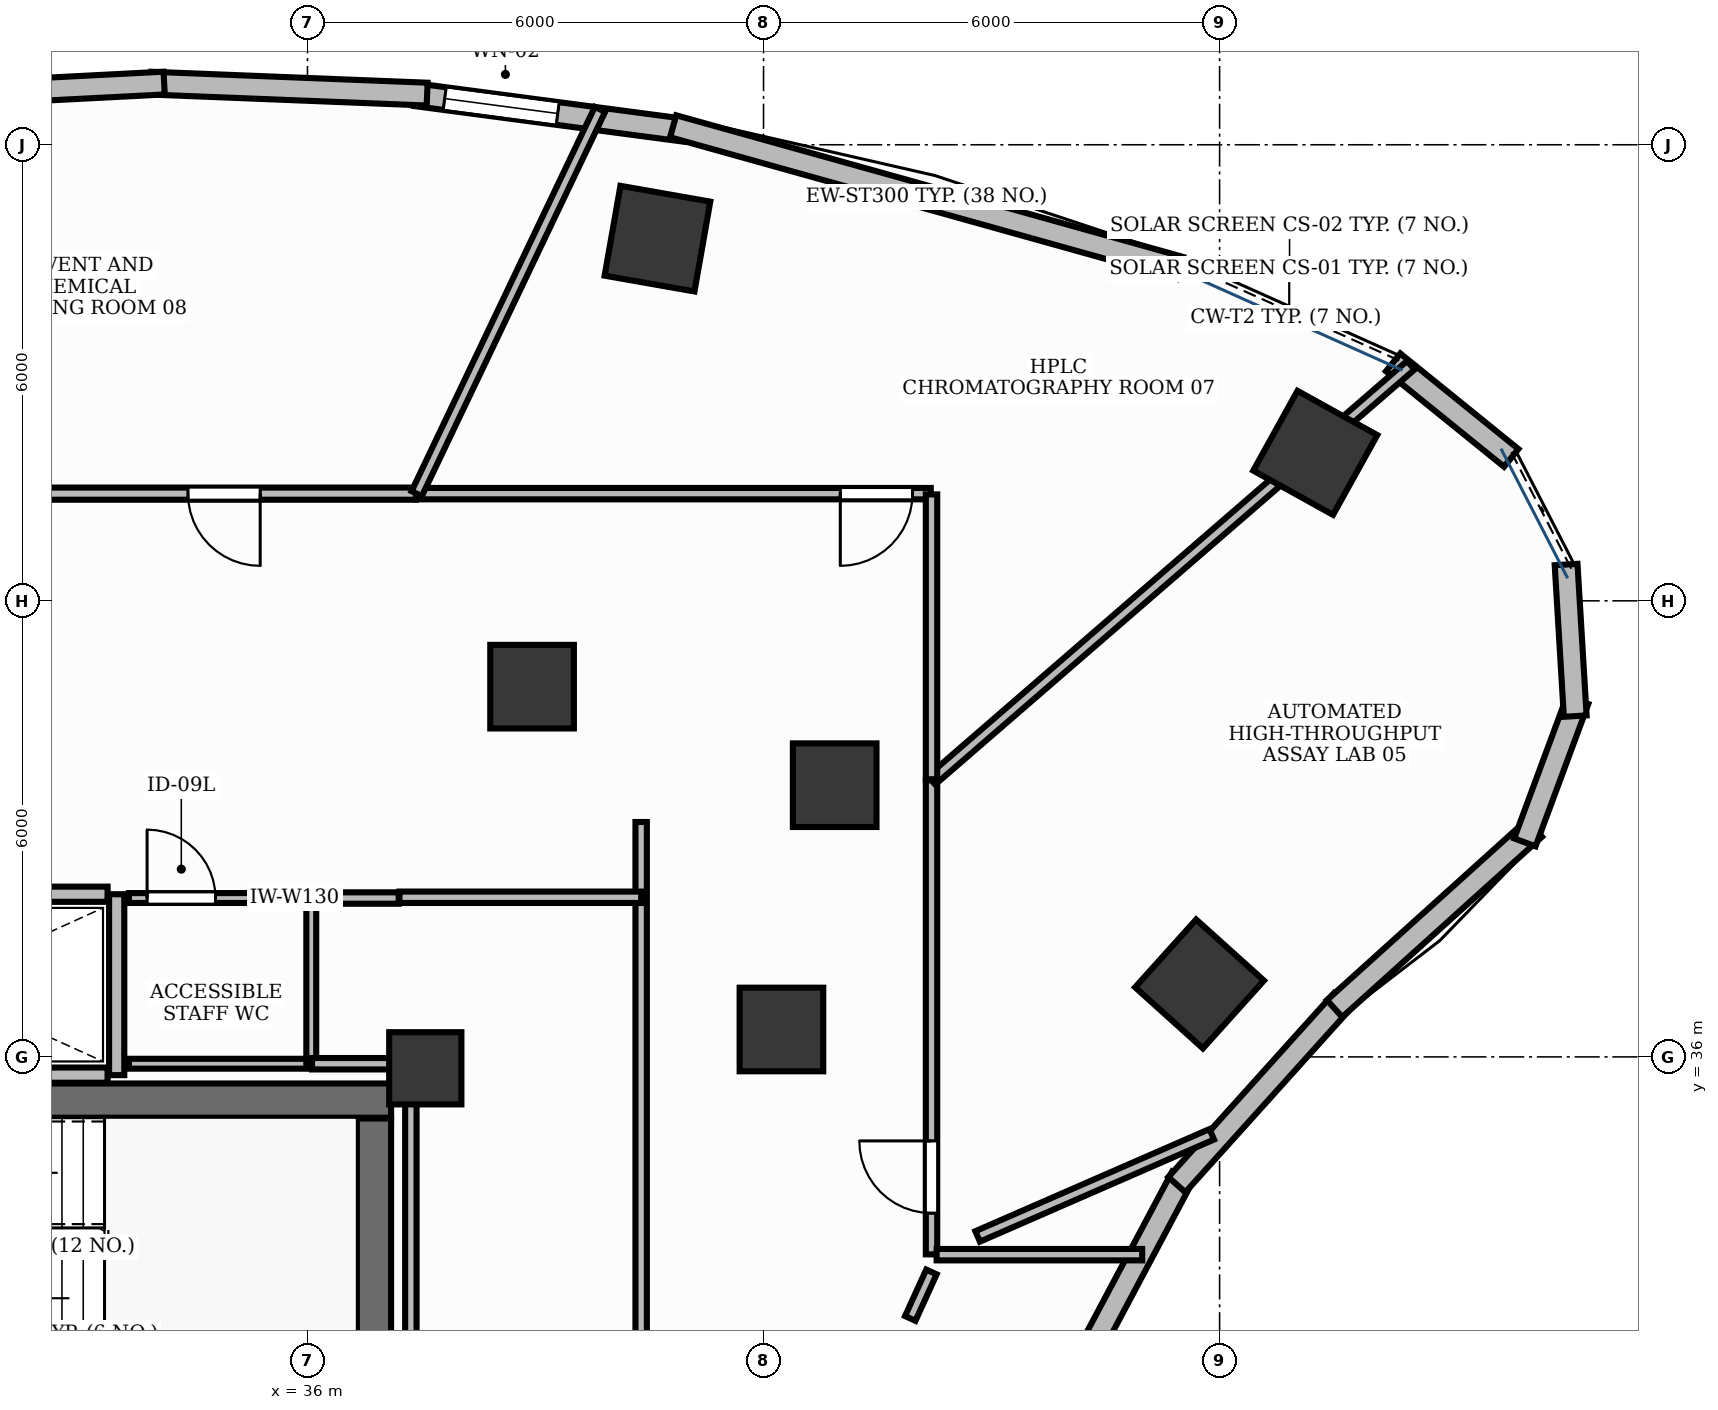
"""IFC4 building model, lengths in metres.
Left out: names, types, materials, properties, quantities, classifications, styles, units other than length and angle.
Written with IfcOpenShell. Run it as: python <this file> out.ifc"""

import sys

from ifc_helpers import new_model, si_unit, direction, frame, frame_2d, origin, origin_2d, place, context, subcontext, project, spatial, rectangle, extrude, element, fill, save


model = new_model("IFC4")
c1 = context("Model", 3, precision=1e-05, world=origin(), true_north=direction((0.0, 1.0)))
c2 = subcontext(c1, "Body", "Model", "MODEL_VIEW")
j1 = project(units=[si_unit("LENGTHUNIT", "METRE"), si_unit("PLANEANGLEUNIT", "RADIAN")], contexts=[c1])
p1 = place(None, origin())
s1 = spatial("IfcSite", under=j1, at=p1, CompositionType="ELEMENT")
p2 = place(p1, origin())
s2 = spatial("IfcBuilding", under=s1, at=p2, CompositionType="ELEMENT")
p3 = place(p2, frame((0.0, 0.0, 106.8)))
s3 = spatial("IfcBuildingStorey", under=s2, at=p3, CompositionType="ELEMENT", Elevation=106.8)
p4 = place(p3, frame((28.852, 35.425, 0.0), z_axis=(0.0, 0.0, 1.0), x_axis=(1.0, 0.0, 0.0)))
e1 = element("IfcWall", 1, at=p4, inside=s3, PredefinedType="SHEAR", context=c2, shape_type="SweptSolid", body=[
    extrude(rectangle(XDim=8.248, YDim=0.45, at=frame_2d((4.124, 0.0))), origin(), (0.0, 0.0, 1.0), 3.9),
])
p5 = place(p3, frame((36.875, 32.11, 0.0), z_axis=(0.0, 0.0, 1.0), x_axis=(0.0, 1.0, 0.0)))
e2 = element("IfcWall", 2, at=p5, inside=s3, PredefinedType="SHEAR", context=c2, shape_type="SweptSolid", body=[
    extrude(rectangle(XDim=3.08, YDim=0.45, at=frame_2d((1.54, 0.0))), origin(), (0.0, 0.0, 1.0), 3.9),
])
p6 = place(p3, frame((37.55, 35.85, -0.0), z_axis=(0.0, 0.0, 1.0), x_axis=(1.0, 0.0, 0.0)))
e3 = element("IfcColumn", 3, at=p6, inside=s3, PredefinedType="PILASTER", context=c2, shape_type="SweptSolid", body=[
    extrude(rectangle(XDim=0.95, YDim=0.95, at=origin_2d()), origin(), (0.0, 0.0, 1.0), 3.901),
])
p7 = place(p3, frame((49.259, 43.947, -0.0), z_axis=(0.0, 0.0, 1.0), x_axis=(-0.874535078577, 0.484962262797, 0.0)))
e4 = element("IfcColumn", 4, at=p7, inside=s3, PredefinedType="COLUMN", context=c2, shape_type="SweptSolid", body=[
    extrude(rectangle(XDim=1.2, YDim=1.2, at=origin_2d()), origin(), (0.0, 0.0, 1.0), 3.901),
])
p8 = place(p3, frame((42.936, 39.575, -0.0), z_axis=(0.0, 0.0, 1.0), x_axis=(1.0, 0.0, 0.0)))
e5 = element("IfcColumn", 5, at=p8, inside=s3, PredefinedType="COLUMN", context=c2, shape_type="SweptSolid", body=[
    extrude(rectangle(XDim=1.1, YDim=1.1, at=origin_2d()), origin(), (0.0, 0.0, 1.0), 3.901),
])
p9 = place(p3, frame((40.604, 46.765, -0.0), z_axis=(0.0, 0.0, 1.0), x_axis=(-0.984868307662, 0.173304404339, 0.0)))
e6 = element("IfcColumn", 6, at=p9, inside=s3, PredefinedType="COLUMN", context=c2, shape_type="SweptSolid", body=[
    extrude(rectangle(XDim=1.2, YDim=1.2, at=origin_2d()), origin(), (0.0, 0.0, 1.0), 3.901),
])
p10 = place(p3, frame((38.955, 40.871, -0.0), z_axis=(0.0, 0.0, 1.0), x_axis=(1.0, 0.0, 0.0)))
e7 = element("IfcColumn", 7, at=p10, inside=s3, PredefinedType="COLUMN", context=c2, shape_type="SweptSolid", body=[
    extrude(rectangle(XDim=1.1, YDim=1.1, at=origin_2d()), origin(), (0.0, 0.0, 1.0), 3.901),
])
p11 = place(p3, frame((47.736, 36.96, -0.0), z_axis=(0.0, 0.0, 1.0), x_axis=(0.669130606359, 0.743144825477, 0.0)))
e8 = element("IfcColumn", 8, at=p11, inside=s3, PredefinedType="COLUMN", context=c2, shape_type="SweptSolid", body=[
    extrude(rectangle(XDim=1.2, YDim=1.2, at=origin_2d()), origin(), (0.0, 0.0, 1.0), 3.901),
])
p12 = place(p3, frame((42.236, 36.361, -0.0), z_axis=(0.0, 0.0, 1.0), x_axis=(1.0, 0.0, 0.0)))
e9 = element("IfcColumn", 9, at=p12, inside=s3, PredefinedType="COLUMN", context=c2, shape_type="SweptSolid", body=[
    extrude(rectangle(XDim=1.1, YDim=1.1, at=origin_2d()), origin(), (0.0, 0.0, 1.0), 3.901),
])
p13 = place(p3, frame((40.964, 48.19, 0.0), z_axis=(0.0, 0.0, 1.0), x_axis=(-0.991369257822, 0.131099178664, 0.0)))
e10 = element("IfcWall", 10, at=p13, inside=s3, PredefinedType="STANDARD", context=c2, shape_type="SweptSolid", body=[
    extrude(rectangle(XDim=3.575, YDim=0.3, at=frame_2d((1.788, 0.0))), origin(), (0.0, 0.0, 1.0), 3.47),
])
p14 = place(p13, frame((1.686, 0.0, 0.95)))
e11 = element("IfcOpeningElement", 11, at=p14, cuts=e10, PredefinedType="OPENING", context=c2, shape_type="SweptSolid", body=[
    extrude(rectangle(XDim=1.5, YDim=1.8, at=frame_2d((0.75, 0.9))), frame((0.0, 0.165, 0.0), z_axis=(0.0, -1.0, 0.0), x_axis=(1.0, 0.0, 0.0)), (0.0, 0.0, 1.0), 0.33),
])
p15 = place(p3, frame((47.479, 46.38, 0.0), z_axis=(0.0, 0.0, 1.0), x_axis=(-0.963116215402, 0.269085777459, 0.0)))
e12 = element("IfcWall", 12, at=p15, inside=s3, PredefinedType="STANDARD", context=c2, shape_type="SweptSolid", body=[
    extrude(rectangle(XDim=6.924, YDim=0.3, at=frame_2d((3.462, 0.0))), origin(), (0.0, 0.0, 1.0), 3.9),
])
p16 = place(p3, frame((37.574, 48.666, 0.0), z_axis=(0.0, 0.0, 1.0), x_axis=(-0.999212076676, 0.039689114679, 0.0)))
e13 = element("IfcWall", 13, at=p16, inside=s3, PredefinedType="STANDARD", context=c2, shape_type="SweptSolid", body=[
    extrude(rectangle(XDim=3.635, YDim=0.3, at=frame_2d((1.818, 0.0))), origin(), (0.0, 0.0, 1.0), 3.9),
])
p17 = place(p3, frame((34.115, 48.812, 0.0), z_axis=(0.0, 0.0, 1.0), x_axis=(-0.998674767218, -0.051465613004, 0.0)))
e14 = element("IfcWall", 14, at=p17, inside=s3, PredefinedType="STANDARD", context=c2, shape_type="SweptSolid", body=[
    extrude(rectangle(XDim=3.634, YDim=0.3, at=frame_2d((1.817, 0.0))), origin(), (0.0, 0.0, 1.0), 3.47),
])
p18 = place(p3, frame((45.98, 31.547, 0.0), z_axis=(0.0, 0.0, 1.0), x_axis=(0.469451284634, 0.882958374645, 0.0)))
e15 = element("IfcWall", 15, at=p18, inside=s3, PredefinedType="STANDARD", context=c2, shape_type="SweptSolid", body=[
    extrude(rectangle(XDim=3.256, YDim=0.3, at=frame_2d((1.628, 0.0))), origin(), (0.0, 0.0, 1.0), 3.9),
])
p19 = place(p3, frame((47.437, 34.319, 0.0), z_axis=(0.0, 0.0, 1.0), x_axis=(0.669167727967, 0.743111399353, 0.0)))
e16 = element("IfcWall", 16, at=p19, inside=s3, PredefinedType="STANDARD", context=c2, shape_type="SweptSolid", body=[
    extrude(rectangle(XDim=3.255, YDim=0.3, at=frame_2d((1.628, 0.0))), origin(), (0.0, 0.0, 1.0), 3.9),
])
p20 = place(p3, frame((49.513, 36.636, 0.0), z_axis=(0.0, 0.0, 1.0), x_axis=(0.74255963233, 0.669779958221, 0.0)))
e17 = element("IfcWall", 17, at=p20, inside=s3, PredefinedType="STANDARD", context=c2, shape_type="SweptSolid", body=[
    extrude(rectangle(XDim=3.539, YDim=0.3, at=frame_2d((1.77, 0.0))), origin(), (0.0, 0.0, 1.0), 3.9),
])
p21 = place(p3, frame((52.016, 38.822, 0.0), z_axis=(0.0, 0.0, 1.0), x_axis=(0.347370087337, 0.937728117539, 0.0)))
e18 = element("IfcWall", 18, at=p21, inside=s3, PredefinedType="STANDARD", context=c2, shape_type="SweptSolid", body=[
    extrude(rectangle(XDim=1.997, YDim=0.3, at=frame_2d((0.999, 0.0))), origin(), (0.0, 0.0, 1.0), 3.9),
])
for number, where, z_axis, x_axis in (
    (19, (52.679, 40.483, 0.0), (0.0, 0.0, 1.0), (-0.06, 0.998, 0.0)),
    (20, (51.836, 43.881, 0.0), (0.0, 0.0, 1.0), (-0.777, 0.629, 0.0)),
):
    element("IfcWall", number, at=place(p3, frame(where, z_axis=z_axis, x_axis=x_axis)), inside=s3, PredefinedType="STANDARD", context=c2, shape_type="SweptSolid", body=[
        extrude(rectangle(XDim=1.998, YDim=0.3, at=frame_2d((0.999, 0.0))), origin(), (0.0, 0.0, 1.0), 3.9),
    ])
p22 = place(p3, frame((33.49, 35.76, 0.0), z_axis=(0.0, 0.0, 1.0), x_axis=(0.0, 1.0, 0.0)))
e21 = element("IfcWall", 21, at=p22, inside=s3, PredefinedType="PARTITIONING", context=c2, shape_type="SweptSolid", body=[
    extrude(rectangle(XDim=2.38, YDim=0.2, at=frame_2d((1.19, 0.0))), origin(), (0.0, 0.0, 1.0), 2.91),
])
for number, where, z_axis, x_axis in (
    (22, (28.8, 35.76, 0.0), (0.0, 0.0, 1.0), (1.0, 0.0, 0.0)),
    (23, (28.8, 38.14, 0.0), (0.0, 0.0, 1.0), (1.0, 0.0, 0.0)),
):
    element("IfcWall", number, at=place(p3, frame(where, z_axis=z_axis, x_axis=x_axis)), inside=s3, PredefinedType="PARTITIONING", context=c2, shape_type="SweptSolid", body=[
        extrude(rectangle(XDim=4.57, YDim=0.2, at=frame_2d((2.285, 0.0))), origin(), (0.0, 0.0, 1.0), 2.91),
    ])
p23 = place(p3, frame((33.65, 38.09, 0.0), z_axis=(0.0, 0.0, 1.0), x_axis=(1.0, 0.0, 0.0)))
e24 = element("IfcWall", 24, at=p23, inside=s3, PredefinedType="PARTITIONING", context=c2, shape_type="SweptSolid", body=[
    extrude(rectangle(XDim=2.4, YDim=0.13, at=frame_2d((1.2, 0.0))), origin(), (0.0, 0.0, 1.0), 2.91),
])
p24 = place(p23, frame((0.24, 0.0, 0.0)))
e25 = element("IfcOpeningElement", 25, at=p24, cuts=e24, PredefinedType="OPENING", context=c2, shape_type="SweptSolid", body=[
    extrude(rectangle(XDim=0.9, YDim=2.15, at=frame_2d((0.45, 1.075))), frame((0.0, 0.08, 0.0), z_axis=(0.0, -1.0, 0.0), x_axis=(1.0, 0.0, 0.0)), (0.0, 0.0, 1.0), 0.16),
])
p25 = place(p3, frame((44.21, 33.402, 0.0), z_axis=(0.0, 0.0, 1.0), x_axis=(0.0, 1.0, 0.0)))
e26 = element("IfcWall", 26, at=p25, inside=s3, PredefinedType="PARTITIONING", context=c2, shape_type="SweptSolid", body=[
    extrude(rectangle(XDim=6.238, YDim=0.15, at=frame_2d((3.119, 0.0))), origin(), (0.0, 0.0, 1.0), 2.91),
])
p26 = place(p25, frame((0.542, 0.0, 0.0)))
e27 = element("IfcOpeningElement", 27, at=p26, cuts=e26, PredefinedType="OPENING", context=c2, shape_type="SweptSolid", body=[
    extrude(rectangle(XDim=0.95, YDim=2.15, at=frame_2d((0.475, 1.075))), frame((0.0, 0.09, 0.0), z_axis=(0.0, -1.0, 0.0), x_axis=(1.0, 0.0, 0.0)), (0.0, 0.0, 1.0), 0.18),
])
p27 = place(p3, frame((40.39, 39.09, 0.0), z_axis=(0.0, 0.0, 1.0), x_axis=(0.0, -1.0, 0.0)))
e28 = element("IfcWall", 28, at=p27, inside=s3, PredefinedType="PARTITIONING", context=c2, shape_type="SweptSolid", body=[
    extrude(rectangle(XDim=10.48, YDim=0.15, at=frame_2d((5.24, 0.0))), origin(), (0.0, 0.0, 1.0), 2.91),
])
p28 = place(p27, frame((7.604, 0.0, 0.0)))
e29 = element("IfcOpeningElement", 29, at=p28, cuts=e28, PredefinedType="OPENING", context=c2, shape_type="SweptSolid", body=[
    extrude(rectangle(XDim=0.95, YDim=2.15, at=frame_2d((0.475, 1.075))), frame((0.0, 0.09, 0.0), z_axis=(0.0, -1.0, 0.0), x_axis=(1.0, 0.0, 0.0)), (0.0, 0.0, 1.0), 0.18),
])
p29 = place(p3, frame((44.2, 43.41, 0.0), z_axis=(0.0, 0.0, 1.0), x_axis=(-1.0, 0.0, 0.0)))
e30 = element("IfcWall", 30, at=p29, inside=s3, PredefinedType="PARTITIONING", context=c2, shape_type="SweptSolid", body=[
    extrude(rectangle(XDim=6.763, YDim=0.15, at=frame_2d((3.381, 0.0))), origin(), (0.0, 0.0, 1.0), 2.91),
])
p30 = place(p29, frame((0.24, 0.0, 0.0)))
e31 = element("IfcOpeningElement", 31, at=p30, cuts=e30, PredefinedType="OPENING", context=c2, shape_type="SweptSolid", body=[
    extrude(rectangle(XDim=0.95, YDim=2.15, at=frame_2d((0.475, 1.075))), frame((0.0, 0.09, 0.0), z_axis=(0.0, -1.0, 0.0), x_axis=(1.0, 0.0, 0.0)), (0.0, 0.0, 1.0), 0.18),
])
p31 = place(p3, frame((37.427, 43.41, 0.0), z_axis=(0.0, 0.0, 1.0), x_axis=(-1.0, 0.0, 0.0)))
e32 = element("IfcWall", 32, at=p31, inside=s3, PredefinedType="PARTITIONING", context=c2, shape_type="SweptSolid", body=[
    extrude(rectangle(XDim=17.385, YDim=0.16, at=frame_2d((8.692, 0.0))), origin(), (0.0, 0.0, 1.0), 2.91),
])
p32 = place(p31, frame((2.049, 0.0, 0.0)))
e33 = element("IfcOpeningElement", 33, at=p32, cuts=e32, PredefinedType="OPENING", context=c2, shape_type="SweptSolid", body=[
    extrude(rectangle(XDim=0.95, YDim=2.15, at=frame_2d((0.475, 1.075))), frame((0.0, 0.095, 0.0), z_axis=(0.0, -1.0, 0.0), x_axis=(1.0, 0.0, 0.0)), (0.0, 0.0, 1.0), 0.19),
])
p33 = place(p3, frame((36.05, 35.91, 0.0), z_axis=(0.0, 0.0, 1.0), x_axis=(-1.0, 0.0, 0.0)))
e34 = element("IfcWall", 34, at=p33, inside=s3, PredefinedType="PARTITIONING", context=c2, shape_type="SweptSolid", body=[
    extrude(rectangle(XDim=2.4, YDim=0.13, at=frame_2d((1.2, 0.0))), origin(), (0.0, 0.0, 1.0), 2.91),
])
p34 = place(p3, frame((36.05, 38.09, 0.0), z_axis=(0.0, 0.0, 1.0), x_axis=(0.0, -1.0, 0.0)))
e35 = element("IfcWall", 35, at=p34, inside=s3, PredefinedType="PARTITIONING", context=c2, shape_type="SweptSolid", body=[
    extrude(rectangle(XDim=2.18, YDim=0.13, at=frame_2d((1.09, 0.0))), origin(), (0.0, 0.0, 1.0), 2.91),
])
p35 = place(p3, frame((43.93, 32.559, 0.0), z_axis=(0.0, 0.0, 1.0), x_axis=(0.414377467152, 0.910105111905, 0.0)))
e36 = element("IfcWall", 36, at=p35, inside=s3, PredefinedType="PARTITIONING", context=c2, shape_type="SweptSolid", body=[
    extrude(rectangle(XDim=0.672, YDim=0.15, at=frame_2d((0.336, 0.0))), origin(), (0.0, 0.0, 1.0), 2.91),
])
p36 = place(p3, frame((44.277, 33.398, 0.0), z_axis=(0.0, 0.0, 1.0), x_axis=(1.0, 0.0, 0.0)))
e37 = element("IfcWall", 37, at=p36, inside=s3, PredefinedType="PARTITIONING", context=c2, shape_type="SweptSolid", body=[
    extrude(rectangle(XDim=2.704, YDim=0.15, at=frame_2d((1.352, 0.0))), origin(), (0.0, 0.0, 1.0), 2.91),
])
p37 = place(p3, frame((47.897, 34.982, 0.0), z_axis=(0.0, 0.0, 1.0), x_axis=(-0.916547126563, -0.399926699271, 0.0)))
e38 = element("IfcWall", 38, at=p37, inside=s3, PredefinedType="PARTITIONING", context=c2, shape_type="SweptSolid", body=[
    extrude(rectangle(XDim=3.36, YDim=0.15, at=frame_2d((1.68, 0.0))), origin(), (0.0, 0.0, 1.0), 2.91),
])
p38 = place(p3, frame((44.21, 39.64, 0.0), z_axis=(0.0, 0.0, 1.0), x_axis=(0.756015454453, 0.654553766033, 0.0)))
e39 = element("IfcWall", 39, at=p38, inside=s3, PredefinedType="PARTITIONING", context=c2, shape_type="SweptSolid", body=[
    extrude(rectangle(XDim=8.34, YDim=0.15, at=frame_2d((4.17, 0.0))), origin(), (0.0, 0.0, 1.0), 2.91),
])
p39 = place(p3, frame((37.35, 35.91, 0.0), z_axis=(0.0, 0.0, 1.0), x_axis=(-1.0, 0.0, 0.0)))
e40 = element("IfcWall", 40, at=p39, inside=s3, PredefinedType="PARTITIONING", context=c2, shape_type="SweptSolid", body=[
    extrude(rectangle(XDim=1.29, YDim=0.15, at=frame_2d((0.645, 0.0))), origin(), (0.0, 0.0, 1.0), 2.91),
])
p40 = place(p3, frame((36.06, 38.09, 0.0), z_axis=(0.0, 0.0, 1.0), x_axis=(1.0, 0.0, 0.0)))
e41 = element("IfcWall", 41, at=p40, inside=s3, PredefinedType="PARTITIONING", context=c2, shape_type="SweptSolid", body=[
    extrude(rectangle(XDim=1.14, YDim=0.15, at=frame_2d((0.57, 0.0))), origin(), (0.0, 0.0, 1.0), 2.91),
])
p41 = place(p3, frame((37.21, 38.1, 0.0), z_axis=(0.0, 0.0, 1.0), x_axis=(1.0, 0.0, 0.0)))
e42 = element("IfcWall", 42, at=p41, inside=s3, PredefinedType="PARTITIONING", context=c2, shape_type="SweptSolid", body=[
    extrude(rectangle(XDim=3.18, YDim=0.15, at=frame_2d((1.59, 0.0))), origin(), (0.0, 0.0, 1.0), 2.91),
])
p42 = place(p3, frame((37.36, 28.61, 0.0), z_axis=(0.0, 0.0, 1.0), x_axis=(0.0, 1.0, 0.0)))
e43 = element("IfcWall", 43, at=p42, inside=s3, PredefinedType="PARTITIONING", context=c2, shape_type="SweptSolid", body=[
    extrude(rectangle(XDim=7.29, YDim=0.15, at=frame_2d((3.645, 0.0))), origin(), (0.0, 0.0, 1.0), 2.91),
])
p43 = place(p3, frame((44.21, 39.653, 0.0), z_axis=(0.0, 0.0, 1.0), x_axis=(0.0, 1.0, 0.0)))
e44 = element("IfcWall", 44, at=p43, inside=s3, PredefinedType="PARTITIONING", context=c2, shape_type="SweptSolid", body=[
    extrude(rectangle(XDim=3.747, YDim=0.15, at=frame_2d((1.874, 0.0))), origin(), (0.0, 0.0, 1.0), 2.91),
])
p44 = place(p3, frame((37.437, 43.41, 0.0), z_axis=(0.0, 0.0, 1.0), x_axis=(0.430520600722, 0.902580751154, 0.0)))
e45 = element("IfcWall", 45, at=p44, inside=s3, PredefinedType="PARTITIONING", context=c2, shape_type="SweptSolid", body=[
    extrude(rectangle(XDim=5.601, YDim=0.15, at=frame_2d((2.801, 0.0))), origin(), (0.0, 0.0, 1.0), 2.91),
])
p45 = place(p14, origin())
e46 = element("IfcWindow", 46, at=p45, inside=s3, PartitioningType="DOUBLE_PANEL_VERTICAL", PredefinedType="WINDOW", context=c2, shape_type="SweptSolid", body=[
    extrude(rectangle(XDim=1.5, YDim=1.8, at=frame_2d((0.75, 0.9))), frame((0.0, 0.03, 0.0), z_axis=(0.0, -1.0, 0.0), x_axis=(1.0, 0.0, 0.0)), (0.0, 0.0, 1.0), 0.06),
])
fill(e11, e46)
p46 = place(p24, origin())
e47 = element("IfcDoor", 47, at=p46, inside=s3, OperationType="SINGLE_SWING_LEFT", PredefinedType="DOOR", context=c2, shape_type="SweptSolid", body=[
    extrude(rectangle(XDim=0.9, YDim=2.15, at=frame_2d((0.45, 1.075))), frame((0.0, 0.025, 0.0), z_axis=(0.0, -1.0, 0.0), x_axis=(1.0, 0.0, 0.0)), (0.0, 0.0, 1.0), 0.05),
])
fill(e25, e47)
p47 = place(p26, origin())
e48 = element("IfcDoor", 48, at=p47, inside=s3, OperationType="SINGLE_SWING_RIGHT", PredefinedType="DOOR", context=c2, shape_type="SweptSolid", body=[
    extrude(rectangle(XDim=0.95, YDim=2.15, at=frame_2d((0.475, 1.075))), frame((0.0, 0.025, 0.0), z_axis=(0.0, -1.0, 0.0), x_axis=(1.0, 0.0, 0.0)), (0.0, 0.0, 1.0), 0.05),
])
fill(e27, e48)
p48 = place(p30, origin())
e49 = element("IfcDoor", 49, at=p48, inside=s3, OperationType="SINGLE_SWING_RIGHT", PredefinedType="DOOR", context=c2, shape_type="SweptSolid", body=[
    extrude(rectangle(XDim=0.95, YDim=2.15, at=frame_2d((0.475, 1.075))), frame((0.0, 0.025, 0.0), z_axis=(0.0, -1.0, 0.0), x_axis=(1.0, 0.0, 0.0)), (0.0, 0.0, 1.0), 0.05),
])
fill(e31, e49)
p49 = place(p32, origin())
e50 = element("IfcDoor", 50, at=p49, inside=s3, OperationType="SINGLE_SWING_LEFT", PredefinedType="DOOR", context=c2, shape_type="SweptSolid", body=[
    extrude(rectangle(XDim=0.95, YDim=2.15, at=frame_2d((0.475, 1.075))), frame((0.0, 0.025, 0.0), z_axis=(0.0, -1.0, 0.0), x_axis=(1.0, 0.0, 0.0)), (0.0, 0.0, 1.0), 0.05),
])
fill(e33, e50)
save(model, sys.argv[1])
